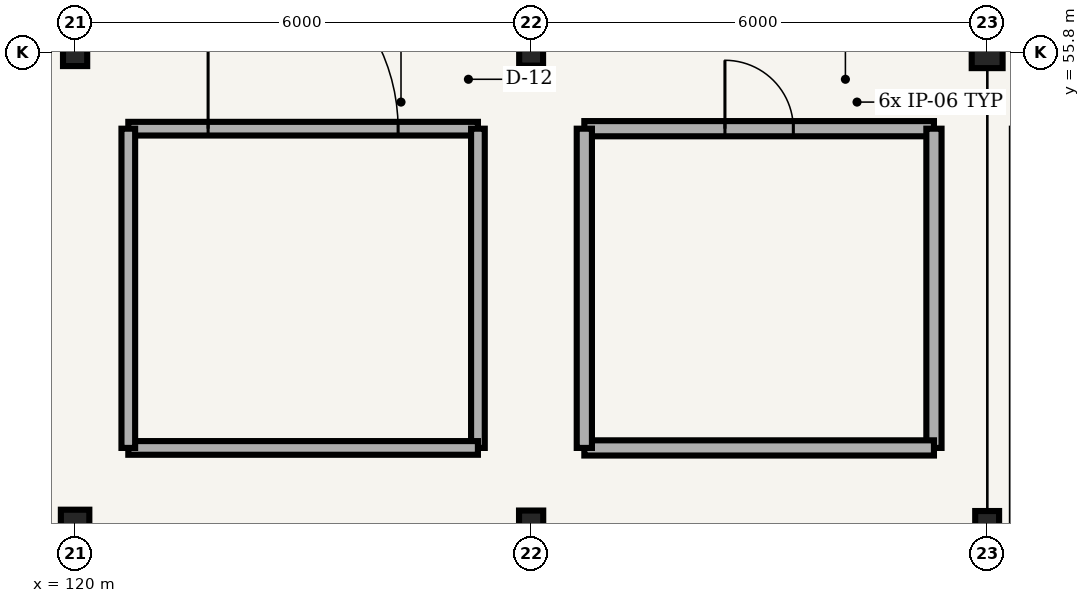
"""IFC4 building model, lengths in metres.
Left out: names, types, materials, properties, quantities, classifications, styles, units other than length and angle.
Written with IfcOpenShell. Run it as: python <this file> out.ifc"""

import sys

from ifc_helpers import new_model, si_unit, direction, frame, frame_2d, origin, origin_2d, place, context, subcontext, project, spatial, rectangle, hollow_circle, i_section, extrude, element, fill, save


model = new_model("IFC4")
c1 = context("Model", 3, precision=1e-05, world=origin(), true_north=direction((0.0, 1.0)))
c2 = subcontext(c1, "Body", "Model", "MODEL_VIEW")
j1 = project(units=[si_unit("LENGTHUNIT", "METRE"), si_unit("PLANEANGLEUNIT", "RADIAN")], contexts=[c1])
p1 = place(None, origin())
s1 = spatial("IfcSite", under=j1, at=p1, CompositionType="ELEMENT")
p2 = place(p1, origin())
s2 = spatial("IfcBuilding", under=s1, at=p2, CompositionType="ELEMENT")
p3 = place(p2, origin())
s3 = spatial("IfcBuildingStorey", under=s2, at=p3, CompositionType="ELEMENT", Elevation=0.0)
p4 = place(p3, frame((120.0, 49.6, 0.0), z_axis=(0.0, 0.0, 1.0), x_axis=(1.0, 0.0, 0.0)))
e1 = element("IfcColumn", 1, at=p4, inside=s3, PredefinedType="COLUMN", context=c2, shape_type="SweptSolid", body=[
    extrude(i_section(OverallWidth=0.375, OverallDepth=0.375, WebThickness=0.017, FlangeThickness=0.027, FilletRadius=0.015, at=origin_2d()), origin(), (0.0, 0.0, 1.0), 5.4),
])
for number, where, z_axis, x_axis in (
    (2, (120.0, 55.8, 0.0), (0.0, 0.0, 1.0), (1.0, 0.0, 0.0)),
    (3, (126.0, 49.6, 0.0), (0.0, 0.0, 1.0), (1.0, 0.0, 0.0)),
):
    element("IfcColumn", number, at=place(p3, frame(where, z_axis=z_axis, x_axis=x_axis)), inside=s3, PredefinedType="COLUMN", context=c2, shape_type="SweptSolid", body=[
        extrude(i_section(OverallWidth=0.318, OverallDepth=0.353, WebThickness=0.023, FlangeThickness=0.038, FilletRadius=0.015, at=origin_2d()), origin(), (0.0, 0.0, 1.0), 5.4),
    ])
for number, where, z_axis, x_axis in (
    (4, (126.0, 55.8, 0.0), (0.0, 0.0, 1.0), (1.0, 0.0, 0.0)),
    (5, (132.0, 49.6, 0.0), (0.0, 0.0, 1.0), (1.0, 0.0, 0.0)),
):
    element("IfcColumn", number, at=place(p3, frame(where, z_axis=z_axis, x_axis=x_axis)), inside=s3, PredefinedType="COLUMN", context=c2, shape_type="SweptSolid", body=[
        extrude(i_section(OverallWidth=0.314, OverallDepth=0.34, WebThickness=0.019, FlangeThickness=0.031, FilletRadius=0.015, at=origin_2d()), origin(), (0.0, 0.0, 1.0), 5.4),
    ])
p5 = place(p3, frame((132.0, 55.8, 0.0), z_axis=(0.0, 0.0, 1.0), x_axis=(1.0, 0.0, 0.0)))
e6 = element("IfcColumn", 6, at=p5, inside=s3, PredefinedType="COLUMN", context=c2, shape_type="SweptSolid", body=[
    extrude(hollow_circle(Radius=0.203, WallThickness=0.016, at=origin_2d()), origin(), (0.0, 0.0, 1.0), 5.4),
])
p6 = place(p3, frame((120.7, 54.8, 0.0), z_axis=(0.0, 0.0, 1.0), x_axis=(1.0, 0.0, 0.0)))
e7 = element("IfcWall", 7, at=p6, inside=s3, PredefinedType="PARTITIONING", context=c2, shape_type="SweptSolid", body=[
    extrude(rectangle(XDim=4.6, YDim=0.18, at=frame_2d((2.3, 0.0))), origin(), (0.0, 0.0, 1.0), 4.35),
])
p7 = place(p6, frame((1.05, 0.0, 0.0)))
e8 = element("IfcOpeningElement", 8, at=p7, cuts=e7, PredefinedType="OPENING", context=c2, shape_type="SweptSolid", body=[
    extrude(rectangle(XDim=2.5, YDim=2.1, at=frame_2d((1.25, 1.05))), frame((0.0, 0.1, 0.0), z_axis=(0.0, -1.0, 0.0), x_axis=(1.0, 0.0, 0.0)), (0.0, 0.0, 1.0), 0.2),
])
p8 = place(p3, frame((125.3, 54.8, 0.0), z_axis=(0.0, 0.0, 1.0), x_axis=(0.0, -1.0, 0.0)))
e9 = element("IfcWall", 9, at=p8, inside=s3, PredefinedType="PARTITIONING", context=c2, shape_type="SweptSolid", body=[
    extrude(rectangle(XDim=4.2, YDim=0.18, at=frame_2d((2.1, 0.0))), origin(), (0.0, 0.0, 1.0), 4.35),
])
p9 = place(p3, frame((125.3, 50.6, 0.0), z_axis=(0.0, 0.0, 1.0), x_axis=(-1.0, 0.0, 0.0)))
e10 = element("IfcWall", 10, at=p9, inside=s3, PredefinedType="PARTITIONING", context=c2, shape_type="SweptSolid", body=[
    extrude(rectangle(XDim=4.6, YDim=0.18, at=frame_2d((2.3, 0.0))), origin(), (0.0, 0.0, 1.0), 4.35),
])
p10 = place(p3, frame((120.7, 50.6, 0.0), z_axis=(0.0, 0.0, 1.0), x_axis=(0.0, 1.0, 0.0)))
e11 = element("IfcWall", 11, at=p10, inside=s3, PredefinedType="PARTITIONING", context=c2, shape_type="SweptSolid", body=[
    extrude(rectangle(XDim=4.2, YDim=0.18, at=frame_2d((2.1, 0.0))), origin(), (0.0, 0.0, 1.0), 4.35),
])
p11 = place(p3, frame((126.7, 54.8, 0.0), z_axis=(0.0, 0.0, 1.0), x_axis=(1.0, 0.0, 0.0)))
e12 = element("IfcWall", 12, at=p11, inside=s3, PredefinedType="PARTITIONING", context=c2, shape_type="SweptSolid", body=[
    extrude(rectangle(XDim=4.6, YDim=0.2, at=frame_2d((2.3, 0.0))), origin(), (0.0, 0.0, 1.0), 4.35),
])
p12 = place(p11, frame((1.85, 0.0, 0.0)))
e13 = element("IfcOpeningElement", 13, at=p12, cuts=e12, PredefinedType="OPENING", context=c2, shape_type="SweptSolid", body=[
    extrude(rectangle(XDim=0.9, YDim=2.25, at=frame_2d((0.45, 1.125))), frame((0.0, 0.11, 0.0), z_axis=(0.0, -1.0, 0.0), x_axis=(1.0, 0.0, 0.0)), (0.0, 0.0, 1.0), 0.22),
])
p13 = place(p3, frame((131.3, 54.8, 0.0), z_axis=(0.0, 0.0, 1.0), x_axis=(0.0, -1.0, 0.0)))
e14 = element("IfcWall", 14, at=p13, inside=s3, PredefinedType="PARTITIONING", context=c2, shape_type="SweptSolid", body=[
    extrude(rectangle(XDim=4.2, YDim=0.2, at=frame_2d((2.1, 0.0))), origin(), (0.0, 0.0, 1.0), 4.35),
])
p14 = place(p3, frame((131.3, 50.6, 0.0), z_axis=(0.0, 0.0, 1.0), x_axis=(-1.0, 0.0, 0.0)))
e15 = element("IfcWall", 15, at=p14, inside=s3, PredefinedType="PARTITIONING", context=c2, shape_type="SweptSolid", body=[
    extrude(rectangle(XDim=4.6, YDim=0.2, at=frame_2d((2.3, 0.0))), origin(), (0.0, 0.0, 1.0), 4.35),
])
p15 = place(p3, frame((126.7, 50.6, 0.0), z_axis=(0.0, 0.0, 1.0), x_axis=(0.0, 1.0, 0.0)))
e16 = element("IfcWall", 16, at=p15, inside=s3, PredefinedType="PARTITIONING", context=c2, shape_type="SweptSolid", body=[
    extrude(rectangle(XDim=4.2, YDim=0.2, at=frame_2d((2.1, 0.0))), origin(), (0.0, 0.0, 1.0), 4.35),
])
p16 = place(p7, origin())
e17 = element("IfcDoor", 17, at=p16, inside=s3, OperationType="DOUBLE_DOOR_SINGLE_SWING", PredefinedType="DOOR", context=c2, shape_type="SweptSolid", body=[
    extrude(rectangle(XDim=2.5, YDim=2.1, at=frame_2d((1.25, 1.05))), frame((0.0, 0.025, 0.0), z_axis=(0.0, -1.0, 0.0), x_axis=(1.0, 0.0, 0.0)), (0.0, 0.0, 1.0), 0.05),
])
fill(e8, e17)
p17 = place(p12, origin())
e18 = element("IfcDoor", 18, at=p17, inside=s3, OperationType="SINGLE_SWING_LEFT", PredefinedType="DOOR", context=c2, shape_type="SweptSolid", body=[
    extrude(rectangle(XDim=0.9, YDim=2.25, at=frame_2d((0.45, 1.125))), frame((0.0, 0.025, 0.0), z_axis=(0.0, -1.0, 0.0), x_axis=(1.0, 0.0, 0.0)), (0.0, 0.0, 1.0), 0.05),
])
fill(e13, e18)
save(model, sys.argv[1])
